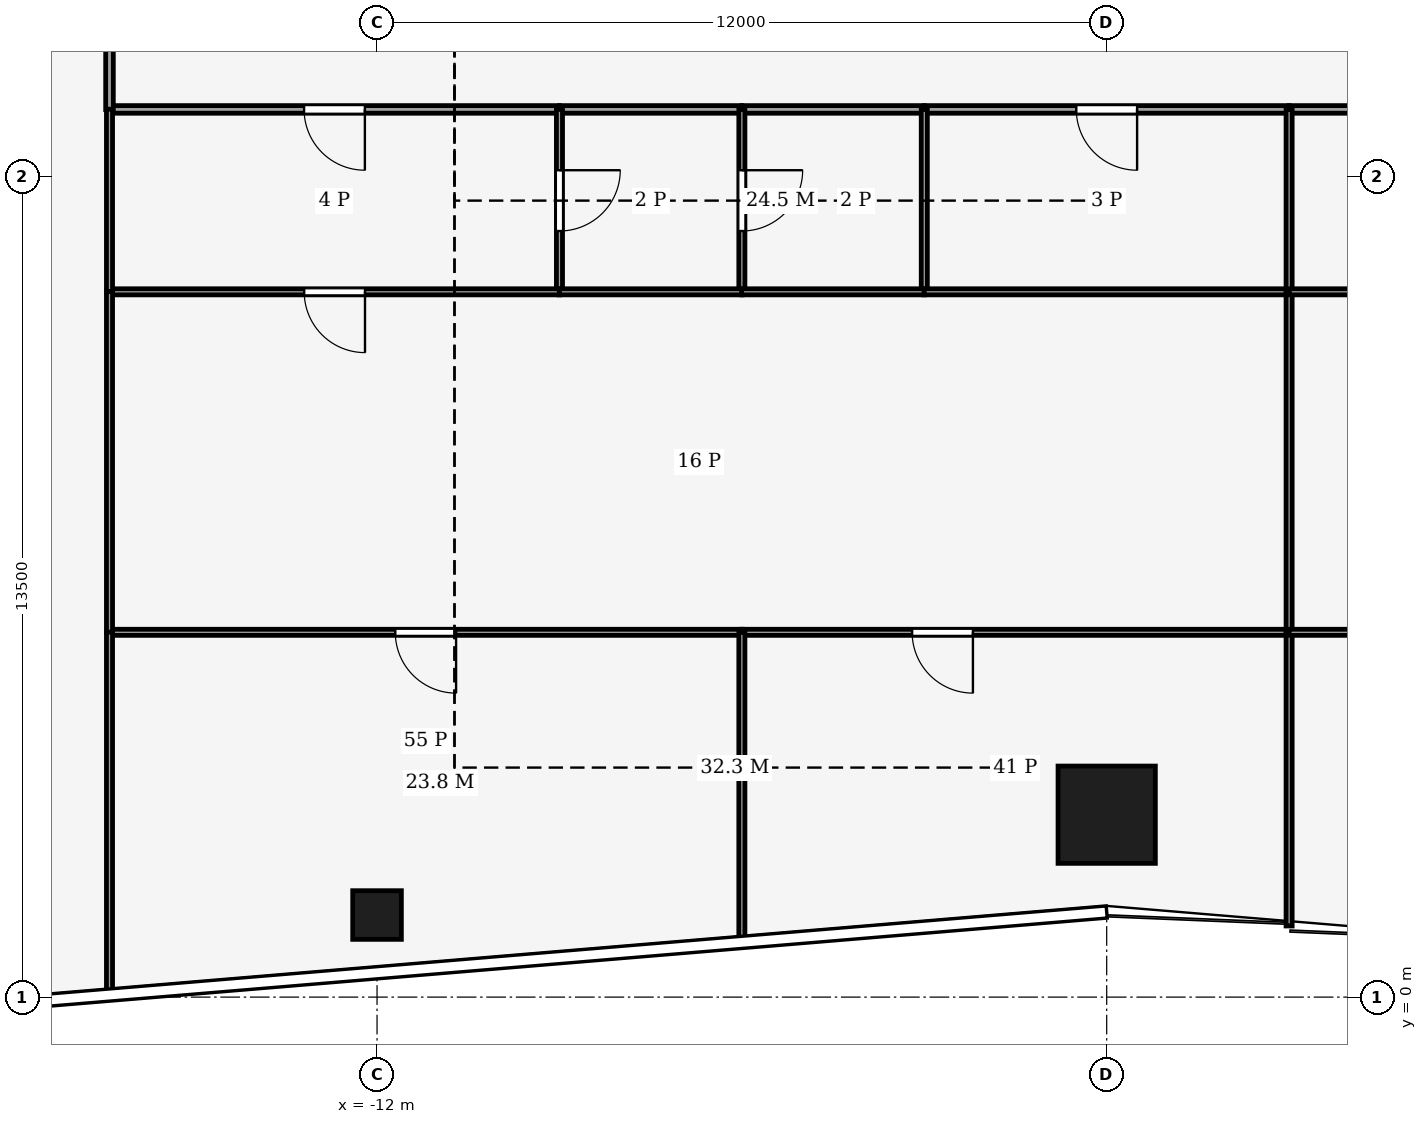
"""IFC4 building model, lengths in metres.
Left out: names, types, materials, properties, quantities, classifications, styles, units other than length and angle.
Written with IfcOpenShell. Run it as: python <this file> out.ifc"""

import sys

from ifc_helpers import new_model, si_unit, direction, frame, frame_2d, origin, origin_2d, place, context, subcontext, project, spatial, rectangle, hollow_rectangle, extrude, element, fill, save


model = new_model("IFC4")
c1 = context("Model", 3, precision=1e-05, world=origin(), true_north=direction((0.0, 1.0)))
c2 = subcontext(c1, "Body", "Model", "MODEL_VIEW")
j1 = project(units=[si_unit("LENGTHUNIT", "METRE"), si_unit("PLANEANGLEUNIT", "RADIAN")], contexts=[c1])
p1 = place(None, origin())
s1 = spatial("IfcSite", under=j1, at=p1, CompositionType="ELEMENT")
p2 = place(p1, origin())
s2 = spatial("IfcBuilding", under=s1, at=p2, CompositionType="ELEMENT")
p3 = place(p2, frame((0.0, 0.0, 34.0)))
s3 = spatial("IfcBuildingStorey", under=s2, at=p3, CompositionType="ELEMENT", Elevation=34.0)
p4 = place(p3, frame((0.0, 3.0, 0.0), z_axis=(0.0, 0.0, 1.0), x_axis=(1.0, 0.0, 0.0)))
e1 = element("IfcColumn", 1, at=p4, inside=s3, PredefinedType="COLUMN", context=c2, shape_type="SweptSolid", body=[
    extrude(hollow_rectangle(XDim=1.6, YDim=1.6, WallThickness=0.09, at=origin_2d()), origin(), (0.0, 0.0, 1.0), 4.0),
])
p5 = place(p3, frame((-12.0, 1.35, 0.0), z_axis=(0.0, 0.0, 1.0), x_axis=(1.0, 0.0, 0.0)))
e2 = element("IfcColumn", 2, at=p5, inside=s3, PredefinedType="COLUMN", context=c2, shape_type="SweptSolid", body=[
    extrude(hollow_rectangle(XDim=0.8, YDim=0.8, WallThickness=0.04, at=origin_2d()), origin(), (0.0, 0.0, 1.0), 4.0),
])
p6 = place(p3, frame((-9.0, 14.6, 0.0), z_axis=(0.0, 0.0, 1.0), x_axis=(-1.0, 0.0, 0.0)))
e3 = element("IfcWall", 3, at=p6, inside=s3, PredefinedType="PARTITIONING", context=c2, shape_type="SweptSolid", body=[
    extrude(rectangle(XDim=7.4, YDim=0.125, at=frame_2d((3.7, 0.0))), origin(), (0.0, 0.0, 1.0), 3.29),
])
p7 = place(p6, frame((3.2, 0.0, 0.0)))
e4 = element("IfcOpeningElement", 4, at=p7, cuts=e3, PredefinedType="OPENING", context=c2, shape_type="SweptSolid", body=[
    extrude(rectangle(XDim=1.0, YDim=2.1, at=frame_2d((0.5, 1.05))), frame((0.0, 0.073, 0.0), z_axis=(0.0, -1.0, 0.0), x_axis=(1.0, 0.0, 0.0)), (0.0, 0.0, 1.0), 0.145),
])
for number, where, z_axis, x_axis in (
    (5, (-9.0, 14.6, 0.0), (0.0, 0.0, 1.0), (1.0, 0.0, 0.0)),
    (6, (-6.0, 14.6, 0.0), (0.0, 0.0, 1.0), (1.0, 0.0, 0.0)),
):
    element("IfcWall", number, at=place(p3, frame(where, z_axis=z_axis, x_axis=x_axis)), inside=s3, PredefinedType="PARTITIONING", context=c2, shape_type="SweptSolid", body=[
        extrude(rectangle(XDim=3.0, YDim=0.125, at=frame_2d((1.5, 0.0))), origin(), (0.0, 0.0, 1.0), 3.29),
    ])
p8 = place(p3, frame((3.0, 14.6, 0.0), z_axis=(0.0, 0.0, 1.0), x_axis=(-1.0, 0.0, 0.0)))
e7 = element("IfcWall", 7, at=p8, inside=s3, PredefinedType="PARTITIONING", context=c2, shape_type="SweptSolid", body=[
    extrude(rectangle(XDim=6.0, YDim=0.125, at=frame_2d((3.0, 0.0))), origin(), (0.0, 0.0, 1.0), 3.34),
])
p9 = place(p8, frame((2.5, 0.0, 0.0)))
e8 = element("IfcOpeningElement", 8, at=p9, cuts=e7, PredefinedType="OPENING", context=c2, shape_type="SweptSolid", body=[
    extrude(rectangle(XDim=1.0, YDim=2.1, at=frame_2d((0.5, 1.05))), frame((0.0, 0.073, 0.0), z_axis=(0.0, -1.0, 0.0), x_axis=(1.0, 0.0, 0.0)), (0.0, 0.0, 1.0), 0.145),
])
p10 = place(p3, frame((9.0, 14.6, 0.0), z_axis=(0.0, 0.0, 1.0), x_axis=(-1.0, 0.0, 0.0)))
e9 = element("IfcWall", 9, at=p10, inside=s3, PredefinedType="PARTITIONING", context=c2, shape_type="SweptSolid", body=[
    extrude(rectangle(XDim=6.0, YDim=0.125, at=frame_2d((3.0, 0.0))), origin(), (0.0, 0.0, 1.0), 3.29),
])
p11 = place(p10, frame((2.5, 0.0, 0.0)))
e10 = element("IfcOpeningElement", 10, at=p11, cuts=e9, PredefinedType="OPENING", context=c2, shape_type="SweptSolid", body=[
    extrude(rectangle(XDim=1.0, YDim=2.1, at=frame_2d((0.5, 1.05))), frame((0.0, 0.073, 0.0), z_axis=(0.0, -1.0, 0.0), x_axis=(1.0, 0.0, 0.0)), (0.0, 0.0, 1.0), 0.145),
])
p12 = place(p3, frame((-16.4, 14.596, 0.0), z_axis=(0.0, 0.0, 1.0), x_axis=(0.0, 1.0, 0.0)))
e11 = element("IfcWall", 11, at=p12, inside=s3, PredefinedType="PARTITIONING", context=c2, shape_type="SweptSolid", body=[
    extrude(rectangle(XDim=9.404, YDim=0.125, at=frame_2d((4.702, 0.0))), origin(), (0.0, 0.0, 1.0), 3.14),
])
p13 = place(p12, frame((4.202, 0.0, 0.0)))
e12 = element("IfcOpeningElement", 12, at=p13, cuts=e11, PredefinedType="OPENING", context=c2, shape_type="SweptSolid", body=[
    extrude(rectangle(XDim=1.0, YDim=2.1, at=frame_2d((0.5, 1.05))), frame((0.0, 0.073, 0.0), z_axis=(0.0, -1.0, 0.0), x_axis=(1.0, 0.0, 0.0)), (0.0, 0.0, 1.0), 0.145),
])
p14 = place(p3, frame((-9.0, 14.6, 0.0), z_axis=(0.0, 0.0, 1.0), x_axis=(0.0, -1.0, 0.0)))
e13 = element("IfcWall", 13, at=p14, inside=s3, PredefinedType="PARTITIONING", context=c2, shape_type="SweptSolid", body=[
    extrude(rectangle(XDim=3.0, YDim=0.1, at=frame_2d((1.5, 0.0))), origin(), (0.0, 0.0, 1.0), 3.87),
])
p15 = place(p14, frame((1.0, 0.0, 0.0)))
e14 = element("IfcOpeningElement", 14, at=p15, cuts=e13, PredefinedType="OPENING", context=c2, shape_type="SweptSolid", body=[
    extrude(rectangle(XDim=1.0, YDim=2.1, at=frame_2d((0.5, 1.05))), frame((0.0, 0.06, 0.0), z_axis=(0.0, -1.0, 0.0), x_axis=(1.0, 0.0, 0.0)), (0.0, 0.0, 1.0), 0.12),
])
p16 = place(p3, frame((-8.996, 11.6, 0.0), z_axis=(0.0, 0.0, 1.0), x_axis=(-1.0, 0.0, 0.0)))
e15 = element("IfcWall", 15, at=p16, inside=s3, PredefinedType="PARTITIONING", context=c2, shape_type="SweptSolid", body=[
    extrude(rectangle(XDim=7.404, YDim=0.1, at=frame_2d((3.702, 0.0))), origin(), (0.0, 0.0, 1.0), 3.29),
])
p17 = place(p16, frame((3.202, 0.0, 0.0)))
e16 = element("IfcOpeningElement", 16, at=p17, cuts=e15, PredefinedType="OPENING", context=c2, shape_type="SweptSolid", body=[
    extrude(rectangle(XDim=1.0, YDim=2.1, at=frame_2d((0.5, 1.05))), frame((0.0, 0.06, 0.0), z_axis=(0.0, -1.0, 0.0), x_axis=(1.0, 0.0, 0.0)), (0.0, 0.0, 1.0), 0.12),
])
p18 = place(p3, frame((-16.4, 14.604, 0.0), z_axis=(0.0, 0.0, 1.0), x_axis=(0.0, -1.0, 0.0)))
e17 = element("IfcWall", 17, at=p18, inside=s3, PredefinedType="PARTITIONING", context=c2, shape_type="SweptSolid", body=[
    extrude(rectangle(XDim=3.008, YDim=0.1, at=frame_2d((1.504, 0.0))), origin(), (0.0, 0.0, 1.0), 3.87),
])
p19 = place(p3, frame((-6.0, 14.6, 0.0), z_axis=(0.0, 0.0, 1.0), x_axis=(0.0, -1.0, 0.0)))
e18 = element("IfcWall", 18, at=p19, inside=s3, PredefinedType="PARTITIONING", context=c2, shape_type="SweptSolid", body=[
    extrude(rectangle(XDim=3.0, YDim=0.1, at=frame_2d((1.5, 0.0))), origin(), (0.0, 0.0, 1.0), 3.87),
])
p20 = place(p19, frame((1.0, 0.0, 0.0)))
e19 = element("IfcOpeningElement", 19, at=p20, cuts=e18, PredefinedType="OPENING", context=c2, shape_type="SweptSolid", body=[
    extrude(rectangle(XDim=1.0, YDim=2.1, at=frame_2d((0.5, 1.05))), frame((0.0, 0.06, 0.0), z_axis=(0.0, -1.0, 0.0), x_axis=(1.0, 0.0, 0.0)), (0.0, 0.0, 1.0), 0.12),
])
p21 = place(p3, frame((-9.004, 11.6, 0.0), z_axis=(0.0, 0.0, 1.0), x_axis=(1.0, 0.0, 0.0)))
e20 = element("IfcWall", 20, at=p21, inside=s3, PredefinedType="PARTITIONING", context=c2, shape_type="SweptSolid", body=[
    extrude(rectangle(XDim=3.008, YDim=0.1, at=frame_2d((1.504, 0.0))), origin(), (0.0, 0.0, 1.0), 3.29),
])
p22 = place(p3, frame((-3.0, 11.6, 0.0), z_axis=(0.0, 0.0, 1.0), x_axis=(0.0, 1.0, 0.0)))
e21 = element("IfcWall", 21, at=p22, inside=s3, PredefinedType="PARTITIONING", context=c2, shape_type="SweptSolid", body=[
    extrude(rectangle(XDim=3.0, YDim=0.1, at=frame_2d((1.5, 0.0))), origin(), (0.0, 0.0, 1.0), 3.87),
])
p23 = place(p3, frame((-6.004, 11.6, 0.0), z_axis=(0.0, 0.0, 1.0), x_axis=(1.0, 0.0, 0.0)))
e22 = element("IfcWall", 22, at=p23, inside=s3, PredefinedType="PARTITIONING", context=c2, shape_type="SweptSolid", body=[
    extrude(rectangle(XDim=3.008, YDim=0.1, at=frame_2d((1.504, 0.0))), origin(), (0.0, 0.0, 1.0), 3.29),
])
p24 = place(p3, frame((-3.004, 11.6, 0.0), z_axis=(0.0, 0.0, 1.0), x_axis=(1.0, 0.0, 0.0)))
e23 = element("IfcWall", 23, at=p24, inside=s3, PredefinedType="PARTITIONING", context=c2, shape_type="SweptSolid", body=[
    extrude(rectangle(XDim=6.004, YDim=0.1, at=frame_2d((3.002, 0.0))), origin(), (0.0, 0.0, 1.0), 3.34),
])
p25 = place(p3, frame((3.0, 11.6, 0.0), z_axis=(0.0, 0.0, 1.0), x_axis=(0.0, 1.0, 0.0)))
e24 = element("IfcWall", 24, at=p25, inside=s3, PredefinedType="PARTITIONING", context=c2, shape_type="SweptSolid", body=[
    extrude(rectangle(XDim=3.0, YDim=0.1, at=frame_2d((1.5, 0.0))), origin(), (0.0, 0.0, 1.0), 3.87),
])
p26 = place(p3, frame((-6.0, 6.0, 0.0), z_axis=(0.0, 0.0, 1.0), x_axis=(-1.0, 0.0, 0.0)))
e25 = element("IfcWall", 25, at=p26, inside=s3, PredefinedType="PARTITIONING", context=c2, shape_type="SweptSolid", body=[
    extrude(rectangle(XDim=10.4, YDim=0.1, at=frame_2d((5.2, 0.0))), origin(), (0.0, 0.0, 1.0), 3.29),
])
p27 = place(p26, frame((4.7, 0.0, 0.0)))
e26 = element("IfcOpeningElement", 26, at=p27, cuts=e25, PredefinedType="OPENING", context=c2, shape_type="SweptSolid", body=[
    extrude(rectangle(XDim=1.0, YDim=2.1, at=frame_2d((0.5, 1.05))), frame((0.0, 0.06, 0.0), z_axis=(0.0, -1.0, 0.0), x_axis=(1.0, 0.0, 0.0)), (0.0, 0.0, 1.0), 0.12),
])
p28 = place(p3, frame((3.0, 6.0, 0.0), z_axis=(0.0, 0.0, 1.0), x_axis=(-1.0, 0.0, 0.0)))
e27 = element("IfcWall", 27, at=p28, inside=s3, PredefinedType="PARTITIONING", context=c2, shape_type="SweptSolid", body=[
    extrude(rectangle(XDim=9.0, YDim=0.1, at=frame_2d((4.5, 0.0))), origin(), (0.0, 0.0, 1.0), 3.29),
])
p29 = place(p28, frame((5.2, 0.0, 0.0)))
e28 = element("IfcOpeningElement", 28, at=p29, cuts=e27, PredefinedType="OPENING", context=c2, shape_type="SweptSolid", body=[
    extrude(rectangle(XDim=1.0, YDim=2.1, at=frame_2d((0.5, 1.05))), frame((0.0, 0.06, 0.0), z_axis=(0.0, -1.0, 0.0), x_axis=(1.0, 0.0, 0.0)), (0.0, 0.0, 1.0), 0.12),
])
p30 = place(p3, frame((3.0, 6.0, 0.0), z_axis=(0.0, 0.0, 1.0), x_axis=(0.0, 1.0, 0.0)))
e29 = element("IfcWall", 29, at=p30, inside=s3, PredefinedType="PARTITIONING", context=c2, shape_type="SweptSolid", body=[
    extrude(rectangle(XDim=5.6, YDim=0.1, at=frame_2d((2.8, 0.0))), origin(), (0.0, 0.0, 1.0), 3.87),
])
p31 = place(p3, frame((-16.4, 11.604, 0.0), z_axis=(0.0, 0.0, 1.0), x_axis=(0.0, -1.0, 0.0)))
e30 = element("IfcWall", 30, at=p31, inside=s3, PredefinedType="PARTITIONING", context=c2, shape_type="SweptSolid", body=[
    extrude(rectangle(XDim=5.608, YDim=0.1, at=frame_2d((2.804, 0.0))), origin(), (0.0, 0.0, 1.0), 3.87),
])
p32 = place(p3, frame((-6.0, 0.92, 0.0), z_axis=(0.0, 0.0, 1.0), x_axis=(0.0, 1.0, 0.0)))
e31 = element("IfcWall", 31, at=p32, inside=s3, PredefinedType="PARTITIONING", context=c2, shape_type="SweptSolid", body=[
    extrude(rectangle(XDim=5.08, YDim=0.1, at=frame_2d((2.54, 0.0))), origin(), (0.0, 0.0, 1.0), 3.04),
])
p33 = place(p3, frame((-16.4, 6.004, 0.0), z_axis=(0.0, 0.0, 1.0), x_axis=(0.0, -1.0, 0.0)))
e32 = element("IfcWall", 32, at=p33, inside=s3, PredefinedType="PARTITIONING", context=c2, shape_type="SweptSolid", body=[
    extrude(rectangle(XDim=5.951, YDim=0.1, at=frame_2d((2.975, 0.0))), origin(), (0.0, 0.0, 1.0), 3.04),
])
p34 = place(p3, frame((3.0, 1.17, 0.0), z_axis=(0.0, 0.0, 1.0), x_axis=(0.0, 1.0, 0.0)))
e33 = element("IfcWall", 33, at=p34, inside=s3, PredefinedType="PARTITIONING", context=c2, shape_type="SweptSolid", body=[
    extrude(rectangle(XDim=4.83, YDim=0.1, at=frame_2d((2.415, 0.0))), origin(), (0.0, 0.0, 1.0), 3.04),
])
p35 = place(p3, frame((9.004, 11.6, 0.0), z_axis=(0.0, 0.0, 1.0), x_axis=(-1.0, 0.0, 0.0)))
e34 = element("IfcWall", 34, at=p35, inside=s3, PredefinedType="PARTITIONING", context=c2, shape_type="SweptSolid", body=[
    extrude(rectangle(XDim=6.004, YDim=0.1, at=frame_2d((3.002, 0.0))), origin(), (0.0, 0.0, 1.0), 3.29),
])
p36 = place(p35, frame((2.502, 0.0, 0.0)))
e35 = element("IfcOpeningElement", 35, at=p36, cuts=e34, PredefinedType="OPENING", context=c2, shape_type="SweptSolid", body=[
    extrude(rectangle(XDim=1.0, YDim=2.1, at=frame_2d((0.5, 1.05))), frame((0.0, 0.06, 0.0), z_axis=(0.0, -1.0, 0.0), x_axis=(1.0, 0.0, 0.0)), (0.0, 0.0, 1.0), 0.12),
])
p37 = place(p3, frame((9.0, 6.0, 0.0), z_axis=(0.0, 0.0, 1.0), x_axis=(-1.0, 0.0, 0.0)))
e36 = element("IfcWall", 36, at=p37, inside=s3, PredefinedType="PARTITIONING", context=c2, shape_type="SweptSolid", body=[
    extrude(rectangle(XDim=6.0, YDim=0.1, at=frame_2d((3.0, 0.0))), origin(), (0.0, 0.0, 1.0), 3.29),
])
p38 = place(p37, frame((2.5, 0.0, 0.0)))
e37 = element("IfcOpeningElement", 37, at=p38, cuts=e36, PredefinedType="OPENING", context=c2, shape_type="SweptSolid", body=[
    extrude(rectangle(XDim=1.0, YDim=2.1, at=frame_2d((0.5, 1.05))), frame((0.0, 0.06, 0.0), z_axis=(0.0, -1.0, 0.0), x_axis=(1.0, 0.0, 0.0)), (0.0, 0.0, 1.0), 0.12),
])
p39 = place(p7, origin())
e38 = element("IfcDoor", 38, at=p39, inside=s3, OperationType="SINGLE_SWING_LEFT", PredefinedType="DOOR", context=c2, shape_type="SweptSolid", body=[
    extrude(rectangle(XDim=1.0, YDim=2.1, at=frame_2d((0.5, 1.05))), frame((0.0, 0.025, 0.0), z_axis=(0.0, -1.0, 0.0), x_axis=(1.0, 0.0, 0.0)), (0.0, 0.0, 1.0), 0.05),
])
fill(e4, e38)
p40 = place(p9, origin())
e39 = element("IfcDoor", 39, at=p40, inside=s3, OperationType="SINGLE_SWING_RIGHT", PredefinedType="DOOR", context=c2, shape_type="SweptSolid", body=[
    extrude(rectangle(XDim=1.0, YDim=2.1, at=frame_2d((0.5, 1.05))), frame((0.0, 0.025, 0.0), z_axis=(0.0, -1.0, 0.0), x_axis=(1.0, 0.0, 0.0)), (0.0, 0.0, 1.0), 0.05),
])
fill(e8, e39)
p41 = place(p15, origin())
e40 = element("IfcDoor", 40, at=p41, inside=s3, OperationType="SINGLE_SWING_RIGHT", PredefinedType="DOOR", context=c2, shape_type="SweptSolid", body=[
    extrude(rectangle(XDim=1.0, YDim=2.1, at=frame_2d((0.5, 1.05))), frame((0.0, 0.025, 0.0), z_axis=(0.0, -1.0, 0.0), x_axis=(1.0, 0.0, 0.0)), (0.0, 0.0, 1.0), 0.05),
])
fill(e14, e40)
p42 = place(p17, origin())
e41 = element("IfcDoor", 41, at=p42, inside=s3, OperationType="SINGLE_SWING_LEFT", PredefinedType="DOOR", context=c2, shape_type="SweptSolid", body=[
    extrude(rectangle(XDim=1.0, YDim=2.1, at=frame_2d((0.5, 1.05))), frame((0.0, 0.025, 0.0), z_axis=(0.0, -1.0, 0.0), x_axis=(1.0, 0.0, 0.0)), (0.0, 0.0, 1.0), 0.05),
])
fill(e16, e41)
p43 = place(p20, origin())
e42 = element("IfcDoor", 42, at=p43, inside=s3, OperationType="SINGLE_SWING_RIGHT", PredefinedType="DOOR", context=c2, shape_type="SweptSolid", body=[
    extrude(rectangle(XDim=1.0, YDim=2.1, at=frame_2d((0.5, 1.05))), frame((0.0, 0.025, 0.0), z_axis=(0.0, -1.0, 0.0), x_axis=(1.0, 0.0, 0.0)), (0.0, 0.0, 1.0), 0.05),
])
fill(e19, e42)
p44 = place(p27, origin())
e43 = element("IfcDoor", 43, at=p44, inside=s3, OperationType="SINGLE_SWING_LEFT", PredefinedType="DOOR", context=c2, shape_type="SweptSolid", body=[
    extrude(rectangle(XDim=1.0, YDim=2.1, at=frame_2d((0.5, 1.05))), frame((0.0, 0.025, 0.0), z_axis=(0.0, -1.0, 0.0), x_axis=(1.0, 0.0, 0.0)), (0.0, 0.0, 1.0), 0.05),
])
fill(e26, e43)
p45 = place(p29, origin())
e44 = element("IfcDoor", 44, at=p45, inside=s3, OperationType="SINGLE_SWING_RIGHT", PredefinedType="DOOR", context=c2, shape_type="SweptSolid", body=[
    extrude(rectangle(XDim=1.0, YDim=2.1, at=frame_2d((0.5, 1.05))), frame((0.0, 0.025, 0.0), z_axis=(0.0, -1.0, 0.0), x_axis=(1.0, 0.0, 0.0)), (0.0, 0.0, 1.0), 0.05),
])
fill(e28, e44)
save(model, sys.argv[1])
